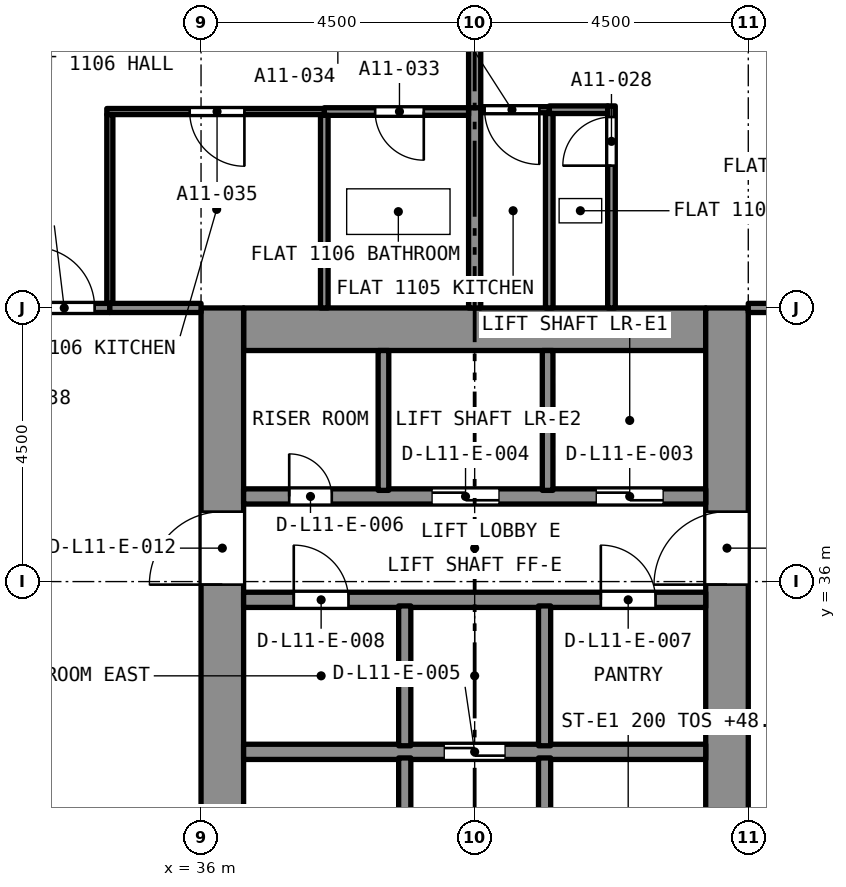
"""IFC4 building model, lengths in metres.
Left out: names, types, materials, properties, quantities, classifications, styles, units other than length and angle.
Written with IfcOpenShell. Run it as: python <this file> out.ifc"""

import sys

from ifc_helpers import new_model, si_unit, direction, frame, frame_2d, origin, place, context, subcontext, project, spatial, rectangle, extrude, element, fill, save


model = new_model("IFC4")
c1 = context("Model", 3, precision=1e-05, world=origin(), true_north=direction((0.0, 1.0)))
c2 = subcontext(c1, "Body", "Model", "MODEL_VIEW")
j1 = project(units=[si_unit("LENGTHUNIT", "METRE"), si_unit("PLANEANGLEUNIT", "RADIAN")], contexts=[c1])
p1 = place(None, origin())
s1 = spatial("IfcSite", under=j1, at=p1, CompositionType="ELEMENT")
p2 = place(p1, origin())
s2 = spatial("IfcBuilding", under=s1, at=p2, CompositionType="ELEMENT")
p3 = place(p2, frame((0.0, 0.0, 46.4)))
s3 = spatial("IfcBuildingStorey", under=s2, at=p3, CompositionType="ELEMENT", Elevation=46.4)
p4 = place(p3, frame((36.7, 40.15, 0.0), z_axis=(0.0, 0.0, 1.0), x_axis=(1.0, 0.0, 0.0)))
e1 = element("IfcWall", 1, at=p4, inside=s3, PredefinedType="SOLIDWALL", context=c2, shape_type="SweptSolid", body=[
    extrude(rectangle(XDim=7.6, YDim=0.7, at=frame_2d((3.8, 0.0))), origin(), (0.0, 0.0, 1.0), 3.2),
])
p5 = place(p3, frame((36.35, 27.0, 0.0), z_axis=(0.0, 0.0, 1.0), x_axis=(0.0, 1.0, 0.0)))
e2 = element("IfcWall", 2, at=p5, inside=s3, PredefinedType="SOLIDWALL", context=c2, shape_type="SweptSolid", body=[
    extrude(rectangle(XDim=13.5, YDim=0.7, at=frame_2d((6.75, 0.0))), origin(), (0.0, 0.0, 1.0), 3.2),
])
p6 = place(p5, frame((8.95, 0.0, 0.0)))
e3 = element("IfcOpeningElement", 3, at=p6, cuts=e2, PredefinedType="OPENING", context=c2, shape_type="SweptSolid", body=[
    extrude(rectangle(XDim=1.2, YDim=2.1, at=frame_2d((0.6, 1.05))), frame((0.0, 0.36, 0.0), z_axis=(0.0, -1.0, 0.0), x_axis=(1.0, 0.0, 0.0)), (0.0, 0.0, 1.0), 0.72),
])
p7 = place(p3, frame((44.65, 27.0, 0.0), z_axis=(0.0, 0.0, 1.0), x_axis=(0.0, 1.0, 0.0)))
e4 = element("IfcWall", 4, at=p7, inside=s3, PredefinedType="SOLIDWALL", context=c2, shape_type="SweptSolid", body=[
    extrude(rectangle(XDim=13.5, YDim=0.7, at=frame_2d((6.75, 0.0))), origin(), (0.0, 0.0, 1.0), 3.2),
])
p8 = place(p7, frame((8.95, 0.0, 0.0)))
e5 = element("IfcOpeningElement", 5, at=p8, cuts=e4, PredefinedType="OPENING", context=c2, shape_type="SweptSolid", body=[
    extrude(rectangle(XDim=1.2, YDim=2.1, at=frame_2d((0.6, 1.05))), frame((0.0, 0.36, 0.0), z_axis=(0.0, -1.0, 0.0), x_axis=(1.0, 0.0, 0.0)), (0.0, 0.0, 1.0), 0.72),
])
p9 = place(p3, frame((41.727, 43.76, 0.0), z_axis=(0.0, 0.0, 1.0), x_axis=(1.0, 0.0, 0.0)))
e6 = element("IfcWall", 6, at=p9, inside=s3, PredefinedType="PARTITIONING", context=c2, shape_type="SweptSolid", body=[
    extrude(rectangle(XDim=0.96, YDim=0.125, at=frame_2d((0.48, 0.0))), origin(), (0.0, 0.0, 1.0), 2.9),
])
p10 = place(p3, frame((42.75, 40.5, 0.0), z_axis=(0.0, 0.0, 1.0), x_axis=(0.0, 1.0, 0.0)))
e7 = element("IfcWall", 7, at=p10, inside=s3, PredefinedType="PARTITIONING", context=c2, shape_type="SweptSolid", body=[
    extrude(rectangle(XDim=3.323, YDim=0.125, at=frame_2d((1.661, 0.0))), origin(), (0.0, 0.0, 1.0), 2.9),
])
p11 = place(p10, frame((2.34, 0.0, 0.0)))
e8 = element("IfcOpeningElement", 8, at=p11, cuts=e7, PredefinedType="OPENING", context=c2, shape_type="SweptSolid", body=[
    extrude(rectangle(XDim=0.8, YDim=2.1, at=frame_2d((0.4, 1.05))), frame((0.0, 0.073, 0.0), z_axis=(0.0, -1.0, 0.0), x_axis=(1.0, 0.0, 0.0)), (0.0, 0.0, 1.0), 0.145),
])
p12 = place(p3, frame((41.727, 40.5, 0.0), z_axis=(0.0, 0.0, 1.0), x_axis=(0.0, 1.0, 0.0)))
e9 = element("IfcWall", 9, at=p12, inside=s3, PredefinedType="PARTITIONING", context=c2, shape_type="SweptSolid", body=[
    extrude(rectangle(XDim=3.198, YDim=0.125, at=frame_2d((1.599, 0.0))), origin(), (0.0, 0.0, 1.0), 2.9),
])
p13 = place(p3, frame((41.727, 43.76, 0.0), z_axis=(0.0, 0.0, 1.0), x_axis=(-1.0, 0.0, 0.0)))
e10 = element("IfcWall", 10, at=p13, inside=s3, PredefinedType="PARTITIONING", context=c2, shape_type="SweptSolid", body=[
    extrude(rectangle(XDim=1.127, YDim=0.1, at=frame_2d((0.563, 0.0))), origin(), (0.0, 0.0, 1.0), 2.9),
])
p14 = place(p13, frame((0.164, 0.0, 0.0)))
e11 = element("IfcOpeningElement", 11, at=p14, cuts=e10, PredefinedType="OPENING", context=c2, shape_type="SweptSolid", body=[
    extrude(rectangle(XDim=0.9, YDim=2.1, at=frame_2d((0.45, 1.05))), frame((0.0, 0.06, 0.0), z_axis=(0.0, -1.0, 0.0), x_axis=(1.0, 0.0, 0.0)), (0.0, 0.0, 1.0), 0.12),
])
p15 = place(p3, frame((40.5, 43.71, 0.0), z_axis=(0.0, 0.0, 1.0), x_axis=(0.0, 1.0, 0.0)))
e12 = element("IfcWall", 12, at=p15, inside=s3, PredefinedType="PARTITIONING", context=c2, shape_type="SweptSolid", body=[
    extrude(rectangle(XDim=5.09, YDim=0.2, at=frame_2d((2.545, 0.0))), origin(), (0.0, 0.0, 1.0), 2.9),
])
p16 = place(p3, frame((45.0, 40.5, 0.0), z_axis=(0.0, 0.0, 1.0), x_axis=(1.0, 0.0, 0.0)))
e13 = element("IfcWall", 13, at=p16, inside=s3, PredefinedType="PARTITIONING", context=c2, shape_type="SweptSolid", body=[
    extrude(rectangle(XDim=3.8, YDim=0.15, at=frame_2d((1.9, 0.0))), origin(), (0.0, 0.0, 1.0), 2.9),
])
p17 = place(p16, frame((1.75, 0.0, 0.0)))
e14 = element("IfcOpeningElement", 14, at=p17, cuts=e13, PredefinedType="OPENING", context=c2, shape_type="SweptSolid", body=[
    extrude(rectangle(XDim=1.0, YDim=2.1, at=frame_2d((0.5, 1.05))), frame((0.0, 0.085, 0.0), z_axis=(0.0, -1.0, 0.0), x_axis=(1.0, 0.0, 0.0)), (0.0, 0.0, 1.0), 0.17),
])
p18 = place(p3, frame((40.5, 40.5, 0.0), z_axis=(0.0, 0.0, 1.0), x_axis=(0.0, 1.0, 0.0)))
e15 = element("IfcWall", 15, at=p18, inside=s3, PredefinedType="PARTITIONING", context=c2, shape_type="SweptSolid", body=[
    extrude(rectangle(XDim=3.292, YDim=0.2, at=frame_2d((1.646, 0.0))), origin(), (0.0, 0.0, 1.0), 2.9),
])
p19 = place(p3, frame((40.4, 43.73, 0.0), z_axis=(0.0, 0.0, 1.0), x_axis=(-1.0, 0.0, 0.0)))
e16 = element("IfcWall", 16, at=p19, inside=s3, PredefinedType="PARTITIONING", context=c2, shape_type="SweptSolid", body=[
    extrude(rectangle(XDim=2.373, YDim=0.125, at=frame_2d((1.187, 0.0))), origin(), (0.0, 0.0, 1.0), 2.9),
])
p20 = place(p19, frame((0.737, 0.0, 0.0)))
e17 = element("IfcOpeningElement", 17, at=p20, cuts=e16, PredefinedType="OPENING", context=c2, shape_type="SweptSolid", body=[
    extrude(rectangle(XDim=0.8, YDim=2.1, at=frame_2d((0.4, 1.05))), frame((0.0, 0.073, 0.0), z_axis=(0.0, -1.0, 0.0), x_axis=(1.0, 0.0, 0.0)), (0.0, 0.0, 1.0), 0.145),
])
p21 = place(p3, frame((38.027, 40.5, 0.0), z_axis=(0.0, 0.0, 1.0), x_axis=(0.0, 1.0, 0.0)))
e18 = element("IfcWall", 18, at=p21, inside=s3, PredefinedType="PARTITIONING", context=c2, shape_type="SweptSolid", body=[
    extrude(rectangle(XDim=3.167, YDim=0.125, at=frame_2d((1.584, 0.0))), origin(), (0.0, 0.0, 1.0), 2.9),
])
p22 = place(p3, frame((38.027, 43.73, 0.0), z_axis=(0.0, 0.0, 1.0), x_axis=(-1.0, 0.0, 0.0)))
e19 = element("IfcWall", 19, at=p22, inside=s3, PredefinedType="PARTITIONING", context=c2, shape_type="SweptSolid", body=[
    extrude(rectangle(XDim=3.577, YDim=0.1, at=frame_2d((1.788, 0.0))), origin(), (0.0, 0.0, 1.0), 2.9),
])
p23 = place(p22, frame((1.313, 0.0, 0.0)))
e20 = element("IfcOpeningElement", 20, at=p23, cuts=e19, PredefinedType="OPENING", context=c2, shape_type="SweptSolid", body=[
    extrude(rectangle(XDim=0.9, YDim=2.1, at=frame_2d((0.45, 1.05))), frame((0.0, 0.06, 0.0), z_axis=(0.0, -1.0, 0.0), x_axis=(1.0, 0.0, 0.0)), (0.0, 0.0, 1.0), 0.12),
])
p24 = place(p3, frame((34.5, 40.575, 0.0), z_axis=(0.0, 0.0, 1.0), x_axis=(0.0, 1.0, 0.0)))
e21 = element("IfcWall", 21, at=p24, inside=s3, PredefinedType="PARTITIONING", context=c2, shape_type="SweptSolid", body=[
    extrude(rectangle(XDim=3.105, YDim=0.1, at=frame_2d((1.552, 0.0))), origin(), (0.0, 0.0, 1.0), 2.9),
])
p25 = place(p3, frame((32.2, 40.5, 0.0), z_axis=(0.0, 0.0, 1.0), x_axis=(1.0, 0.0, 0.0)))
e22 = element("IfcWall", 22, at=p25, inside=s3, PredefinedType="PARTITIONING", context=c2, shape_type="SweptSolid", body=[
    extrude(rectangle(XDim=2.3, YDim=0.15, at=frame_2d((1.15, 0.0))), origin(), (0.0, 0.0, 1.0), 2.9),
])
p26 = place(p25, frame((1.05, 0.0, 0.0)))
e23 = element("IfcOpeningElement", 23, at=p26, cuts=e22, PredefinedType="OPENING", context=c2, shape_type="SweptSolid", body=[
    extrude(rectangle(XDim=1.0, YDim=2.1, at=frame_2d((0.5, 1.05))), frame((0.0, 0.085, 0.0), z_axis=(0.0, -1.0, 0.0), x_axis=(1.0, 0.0, 0.0)), (0.0, 0.0, 1.0), 0.17),
])
p27 = place(p3, frame((34.5, 40.5, 0.0), z_axis=(0.0, 0.0, 1.0), x_axis=(1.0, 0.0, 0.0)))
e24 = element("IfcWall", 24, at=p27, inside=s3, PredefinedType="PARTITIONING", context=c2, shape_type="SweptSolid", body=[
    extrude(rectangle(XDim=1.5, YDim=0.15, at=frame_2d((0.75, 0.0))), origin(), (0.0, 0.0, 1.0), 2.9),
])
p28 = place(p3, frame((36.7, 33.2, 0.0), z_axis=(0.0, 0.0, 1.0), x_axis=(1.0, 0.0, 0.0)))
e25 = element("IfcWall", 25, at=p28, inside=s3, PredefinedType="SOLIDWALL", context=c2, shape_type="SweptSolid", body=[
    extrude(rectangle(XDim=7.6, YDim=0.25, at=frame_2d((3.8, 0.0))), origin(), (0.0, 0.0, 1.0), 2.9),
])
p29 = place(p28, frame((3.3, 0.0, 0.0)))
e26 = element("IfcOpeningElement", 26, at=p29, cuts=e25, PredefinedType="OPENING", context=c2, shape_type="SweptSolid", body=[
    extrude(rectangle(XDim=1.0, YDim=2.1, at=frame_2d((0.5, 1.05))), frame((0.0, 0.135, 0.0), z_axis=(0.0, -1.0, 0.0), x_axis=(1.0, 0.0, 0.0)), (0.0, 0.0, 1.0), 0.27),
])
p30 = place(p3, frame((36.7, 35.7, 0.0), z_axis=(0.0, 0.0, 1.0), x_axis=(1.0, 0.0, 0.0)))
e27 = element("IfcWall", 27, at=p30, inside=s3, PredefinedType="SOLIDWALL", context=c2, shape_type="SweptSolid", body=[
    extrude(rectangle(XDim=7.6, YDim=0.25, at=frame_2d((3.8, 0.0))), origin(), (0.0, 0.0, 1.0), 2.9),
])
p31 = place(p30, frame((5.875, 0.0, 0.0)))
e28 = element("IfcOpeningElement", 28, at=p31, cuts=e27, PredefinedType="OPENING", context=c2, shape_type="SweptSolid", body=[
    extrude(rectangle(XDim=0.9, YDim=2.1, at=frame_2d((0.45, 1.05))), frame((0.0, 0.135, 0.0), z_axis=(0.0, -1.0, 0.0), x_axis=(1.0, 0.0, 0.0)), (0.0, 0.0, 1.0), 0.27),
])
p32 = place(p30, frame((0.825, 0.0, 0.0)))
e29 = element("IfcOpeningElement", 29, at=p32, cuts=e27, PredefinedType="OPENING", context=c2, shape_type="SweptSolid", body=[
    extrude(rectangle(XDim=0.9, YDim=2.1, at=frame_2d((0.45, 1.05))), frame((0.0, 0.135, 0.0), z_axis=(0.0, -1.0, 0.0), x_axis=(1.0, 0.0, 0.0)), (0.0, 0.0, 1.0), 0.27),
])
p33 = place(p3, frame((36.7, 37.4, 0.0), z_axis=(0.0, 0.0, 1.0), x_axis=(1.0, 0.0, 0.0)))
e30 = element("IfcWall", 30, at=p33, inside=s3, PredefinedType="SOLIDWALL", context=c2, shape_type="SweptSolid", body=[
    extrude(rectangle(XDim=7.6, YDim=0.25, at=frame_2d((3.8, 0.0))), origin(), (0.0, 0.0, 1.0), 2.9),
])
p34 = place(p33, frame((5.8, 0.0, 0.0)))
e31 = element("IfcOpeningElement", 31, at=p34, cuts=e30, PredefinedType="OPENING", context=c2, shape_type="SweptSolid", body=[
    extrude(rectangle(XDim=1.1, YDim=2.4, at=frame_2d((0.55, 1.2))), frame((0.0, 0.135, 0.0), z_axis=(0.0, -1.0, 0.0), x_axis=(1.0, 0.0, 0.0)), (0.0, 0.0, 1.0), 0.27),
])
p35 = place(p33, frame((3.1, 0.0, 0.0)))
e32 = element("IfcOpeningElement", 32, at=p35, cuts=e30, PredefinedType="OPENING", context=c2, shape_type="SweptSolid", body=[
    extrude(rectangle(XDim=1.1, YDim=2.4, at=frame_2d((0.55, 1.2))), frame((0.0, 0.135, 0.0), z_axis=(0.0, -1.0, 0.0), x_axis=(1.0, 0.0, 0.0)), (0.0, 0.0, 1.0), 0.27),
])
p36 = place(p33, frame((0.75, 0.0, 0.0)))
e33 = element("IfcOpeningElement", 33, at=p36, cuts=e30, PredefinedType="OPENING", context=c2, shape_type="SweptSolid", body=[
    extrude(rectangle(XDim=0.7, YDim=2.1, at=frame_2d((0.35, 1.05))), frame((0.0, 0.135, 0.0), z_axis=(0.0, -1.0, 0.0), x_axis=(1.0, 0.0, 0.0)), (0.0, 0.0, 1.0), 0.27),
])
p37 = place(p3, frame((41.65, 27.7, 0.0), z_axis=(0.0, 0.0, 1.0), x_axis=(0.0, 1.0, 0.0)))
e34 = element("IfcWall", 34, at=p37, inside=s3, PredefinedType="SOLIDWALL", context=c2, shape_type="SweptSolid", body=[
    extrude(rectangle(XDim=5.4, YDim=0.2, at=frame_2d((2.7, 0.0))), origin(), (0.0, 0.0, 1.0), 2.9),
])
p38 = place(p37, frame((0.2, 0.0, 0.0)))
e35 = element("IfcOpeningElement", 35, at=p38, cuts=e34, PredefinedType="OPENING", context=c2, shape_type="SweptSolid", body=[
    extrude(rectangle(XDim=0.9, YDim=2.1, at=frame_2d((0.45, 1.05))), frame((0.0, 0.11, 0.0), z_axis=(0.0, -1.0, 0.0), x_axis=(1.0, 0.0, 0.0)), (0.0, 0.0, 1.0), 0.22),
])
p39 = place(p3, frame((39.35, 27.7, 0.0), z_axis=(0.0, 0.0, 1.0), x_axis=(0.0, 1.0, 0.0)))
e36 = element("IfcWall", 36, at=p39, inside=s3, PredefinedType="SOLIDWALL", context=c2, shape_type="SweptSolid", body=[
    extrude(rectangle(XDim=5.4, YDim=0.2, at=frame_2d((2.7, 0.0))), origin(), (0.0, 0.0, 1.0), 2.9),
])
p40 = place(p39, frame((0.2, 0.0, 0.0)))
e37 = element("IfcOpeningElement", 37, at=p40, cuts=e36, PredefinedType="OPENING", context=c2, shape_type="SweptSolid", body=[
    extrude(rectangle(XDim=0.9, YDim=2.1, at=frame_2d((0.45, 1.05))), frame((0.0, 0.11, 0.0), z_axis=(0.0, -1.0, 0.0), x_axis=(1.0, 0.0, 0.0)), (0.0, 0.0, 1.0), 0.22),
])
for number, where, z_axis, x_axis in (
    (38, (41.65, 33.3, 0.0), (0.0, 0.0, 1.0), (0.0, 1.0, 0.0)),
    (39, (39.35, 33.3, 0.0), (0.0, 0.0, 1.0), (0.0, 1.0, 0.0)),
):
    element("IfcWall", number, at=place(p3, frame(where, z_axis=z_axis, x_axis=x_axis)), inside=s3, PredefinedType="SOLIDWALL", context=c2, shape_type="SweptSolid", body=[
        extrude(rectangle(XDim=2.3, YDim=0.2, at=frame_2d((1.15, 0.0))), origin(), (0.0, 0.0, 1.0), 2.9),
    ])
for number, where, z_axis, x_axis in (
    (40, (41.7, 37.5, 0.0), (0.0, 0.0, 1.0), (0.0, 1.0, 0.0)),
    (41, (39.0, 37.5, 0.0), (0.0, 0.0, 1.0), (0.0, 1.0, 0.0)),
):
    element("IfcWall", number, at=place(p3, frame(where, z_axis=z_axis, x_axis=x_axis)), inside=s3, PredefinedType="SOLIDWALL", context=c2, shape_type="SweptSolid", body=[
        extrude(rectangle(XDim=2.3, YDim=0.175, at=frame_2d((1.15, 0.0))), origin(), (0.0, 0.0, 1.0), 2.9),
    ])
p41 = place(p11, origin())
e42 = element("IfcDoor", 42, at=p41, inside=s3, OperationType="SINGLE_SWING_RIGHT", PredefinedType="DOOR", context=c2, shape_type="SweptSolid", body=[
    extrude(rectangle(XDim=0.8, YDim=2.1, at=frame_2d((0.4, 1.05))), frame((0.0, 0.025, 0.0), z_axis=(0.0, -1.0, 0.0), x_axis=(1.0, 0.0, 0.0)), (0.0, 0.0, 1.0), 0.05),
])
fill(e8, e42)
p42 = place(p14, origin())
e43 = element("IfcDoor", 43, at=p42, inside=s3, OperationType="SINGLE_SWING_RIGHT", PredefinedType="DOOR", context=c2, shape_type="SweptSolid", body=[
    extrude(rectangle(XDim=0.9, YDim=2.1, at=frame_2d((0.45, 1.05))), frame((0.0, 0.025, 0.0), z_axis=(0.0, -1.0, 0.0), x_axis=(1.0, 0.0, 0.0)), (0.0, 0.0, 1.0), 0.05),
])
fill(e11, e43)
p43 = place(p20, origin())
e44 = element("IfcDoor", 44, at=p43, inside=s3, OperationType="SINGLE_SWING_LEFT", PredefinedType="DOOR", context=c2, shape_type="SweptSolid", body=[
    extrude(rectangle(XDim=0.8, YDim=2.1, at=frame_2d((0.4, 1.05))), frame((0.0, 0.025, 0.0), z_axis=(0.0, -1.0, 0.0), x_axis=(1.0, 0.0, 0.0)), (0.0, 0.0, 1.0), 0.05),
])
fill(e17, e44)
p44 = place(p23, origin())
e45 = element("IfcDoor", 45, at=p44, inside=s3, OperationType="SINGLE_SWING_LEFT", PredefinedType="DOOR", context=c2, shape_type="SweptSolid", body=[
    extrude(rectangle(XDim=0.9, YDim=2.1, at=frame_2d((0.45, 1.05))), frame((0.0, 0.025, 0.0), z_axis=(0.0, -1.0, 0.0), x_axis=(1.0, 0.0, 0.0)), (0.0, 0.0, 1.0), 0.05),
])
fill(e20, e45)
p45 = place(p26, origin())
e46 = element("IfcDoor", 46, at=p45, inside=s3, OperationType="SINGLE_SWING_RIGHT", PredefinedType="DOOR", context=c2, shape_type="SweptSolid", body=[
    extrude(rectangle(XDim=1.0, YDim=2.1, at=frame_2d((0.5, 1.05))), frame((0.0, 0.025, 0.0), z_axis=(0.0, -1.0, 0.0), x_axis=(1.0, 0.0, 0.0)), (0.0, 0.0, 1.0), 0.05),
])
fill(e23, e46)
p46 = place(p34, origin())
e47 = element("IfcDoor", 47, at=p46, inside=s3, OperationType="SLIDING_TO_LEFT", PredefinedType="DOOR", context=c2, shape_type="SweptSolid", body=[
    extrude(rectangle(XDim=1.1, YDim=2.4, at=frame_2d((0.55, 1.2))), frame((0.0, 0.025, 0.0), z_axis=(0.0, -1.0, 0.0), x_axis=(1.0, 0.0, 0.0)), (0.0, 0.0, 1.0), 0.05),
])
fill(e31, e47)
p47 = place(p35, origin())
e48 = element("IfcDoor", 48, at=p47, inside=s3, OperationType="SLIDING_TO_LEFT", PredefinedType="DOOR", context=c2, shape_type="SweptSolid", body=[
    extrude(rectangle(XDim=1.1, YDim=2.4, at=frame_2d((0.55, 1.2))), frame((0.0, 0.025, 0.0), z_axis=(0.0, -1.0, 0.0), x_axis=(1.0, 0.0, 0.0)), (0.0, 0.0, 1.0), 0.05),
])
fill(e32, e48)
p48 = place(p29, origin())
e49 = element("IfcDoor", 49, at=p48, inside=s3, OperationType="SLIDING_TO_LEFT", PredefinedType="DOOR", context=c2, shape_type="SweptSolid", body=[
    extrude(rectangle(XDim=1.0, YDim=2.1, at=frame_2d((0.5, 1.05))), frame((0.0, 0.025, 0.0), z_axis=(0.0, -1.0, 0.0), x_axis=(1.0, 0.0, 0.0)), (0.0, 0.0, 1.0), 0.05),
])
fill(e26, e49)
p49 = place(p36, origin())
e50 = element("IfcDoor", 50, at=p49, inside=s3, OperationType="SINGLE_SWING_LEFT", PredefinedType="DOOR", context=c2, shape_type="SweptSolid", body=[
    extrude(rectangle(XDim=0.7, YDim=2.1, at=frame_2d((0.35, 1.05))), frame((0.0, 0.025, 0.0), z_axis=(0.0, -1.0, 0.0), x_axis=(1.0, 0.0, 0.0)), (0.0, 0.0, 1.0), 0.05),
])
fill(e33, e50)
p50 = place(p31, origin())
e51 = element("IfcDoor", 51, at=p50, inside=s3, OperationType="SINGLE_SWING_LEFT", PredefinedType="DOOR", context=c2, shape_type="SweptSolid", body=[
    extrude(rectangle(XDim=0.9, YDim=2.1, at=frame_2d((0.45, 1.05))), frame((0.0, 0.025, 0.0), z_axis=(0.0, -1.0, 0.0), x_axis=(1.0, 0.0, 0.0)), (0.0, 0.0, 1.0), 0.05),
])
fill(e28, e51)
p51 = place(p32, origin())
e52 = element("IfcDoor", 52, at=p51, inside=s3, OperationType="SINGLE_SWING_LEFT", PredefinedType="DOOR", context=c2, shape_type="SweptSolid", body=[
    extrude(rectangle(XDim=0.9, YDim=2.1, at=frame_2d((0.45, 1.05))), frame((0.0, 0.025, 0.0), z_axis=(0.0, -1.0, 0.0), x_axis=(1.0, 0.0, 0.0)), (0.0, 0.0, 1.0), 0.05),
])
fill(e29, e52)
p52 = place(p6, origin())
e53 = element("IfcDoor", 53, at=p52, inside=s3, OperationType="SINGLE_SWING_LEFT", PredefinedType="DOOR", context=c2, shape_type="SweptSolid", body=[
    extrude(rectangle(XDim=1.2, YDim=2.1, at=frame_2d((0.6, 1.05))), frame((0.0, 0.025, 0.0), z_axis=(0.0, -1.0, 0.0), x_axis=(1.0, 0.0, 0.0)), (0.0, 0.0, 1.0), 0.05),
])
fill(e3, e53)
p53 = place(p8, origin())
e54 = element("IfcDoor", 54, at=p53, inside=s3, OperationType="SINGLE_SWING_LEFT", PredefinedType="DOOR", context=c2, shape_type="SweptSolid", body=[
    extrude(rectangle(XDim=1.2, YDim=2.1, at=frame_2d((0.6, 1.05))), frame((0.0, 0.025, 0.0), z_axis=(0.0, -1.0, 0.0), x_axis=(1.0, 0.0, 0.0)), (0.0, 0.0, 1.0), 0.05),
])
fill(e5, e54)
save(model, sys.argv[1])
